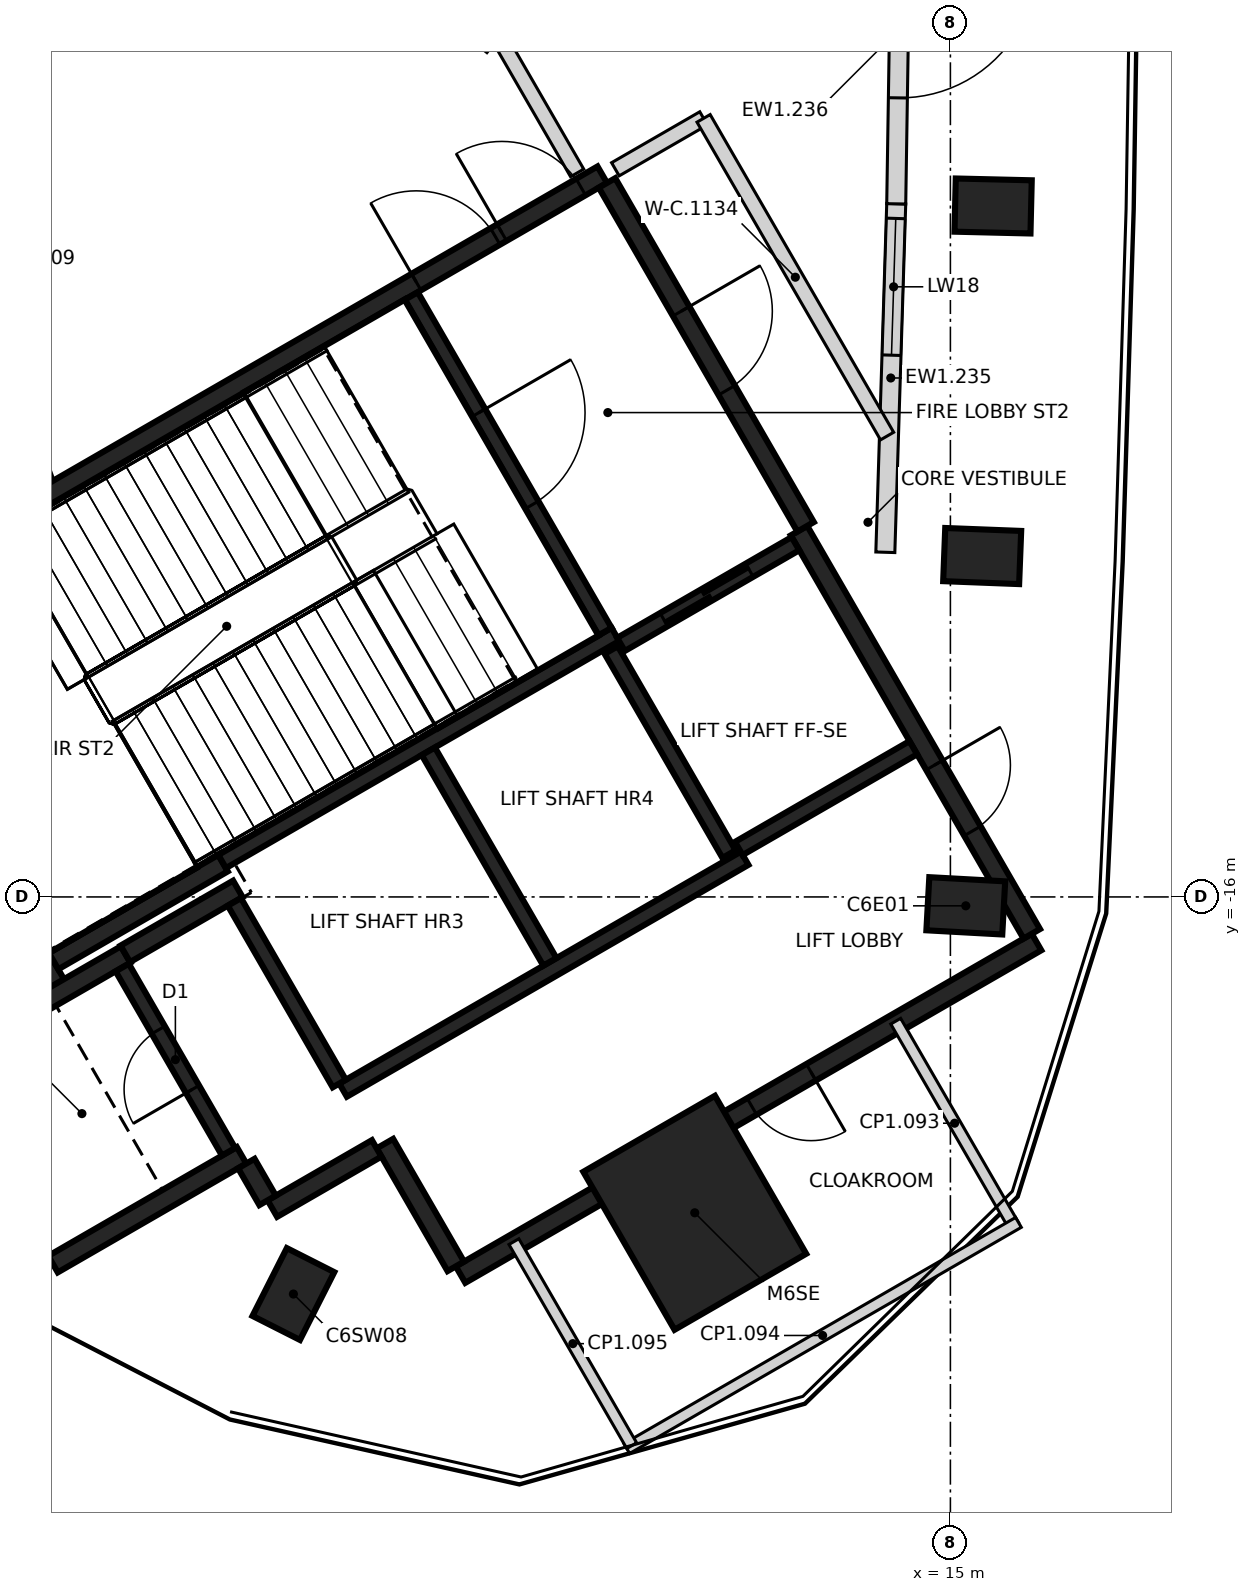
"""IFC4 building model, lengths in metres.
Left out: names, types, materials, properties, quantities, classifications, styles, units other than length and angle.
Written with IfcOpenShell. Run it as: python <this file> out.ifc"""

import sys

from ifc_helpers import new_model, si_unit, direction, frame, frame_2d, origin, origin_2d, place, context, subcontext, project, spatial, rectangle, extrude, element, fill, save


model = new_model("IFC4")
c1 = context("Model", 3, precision=1e-05, world=origin(), true_north=direction((0.0, 1.0)))
c2 = subcontext(c1, "Body", "Model", "MODEL_VIEW")
j1 = project(units=[si_unit("LENGTHUNIT", "METRE"), si_unit("PLANEANGLEUNIT", "RADIAN")], contexts=[c1])
p1 = place(None, origin())
s1 = spatial("IfcSite", under=j1, at=p1, CompositionType="ELEMENT")
p2 = place(p1, origin())
s2 = spatial("IfcBuilding", under=s1, at=p2, CompositionType="ELEMENT")
p3 = place(p2, frame((0.0, 0.0, 312.6)))
s3 = spatial("IfcBuildingStorey", under=s2, at=p3, CompositionType="ELEMENT", Elevation=312.6)
for number, where, z_axis, x_axis in (
    (1, (15.202, -16.117, -0.35), (0.0, 0.0, 1.0), (-0.998, 0.055, 0.0)),
    (2, (15.418, -11.515, -0.35), (0.0, 0.0, 1.0), (-0.999, 0.039, 0.0)),
    (3, (15.562, -6.91, -0.35), (0.0, 0.0, 1.0), (-1.0, 0.024, 0.0)),
    (4, (6.356, -21.224, -0.35), (0.0, 0.0, 1.0), (0.452, 0.892, 0.0)),
):
    element("IfcColumn", number, at=place(p3, frame(where, z_axis=z_axis, x_axis=x_axis)), inside=s3, PredefinedType="COLUMN", context=c2, shape_type="SweptSolid", body=[
        extrude(rectangle(XDim=1.0, YDim=0.7, at=origin_2d()), origin(), (0.0, 0.0, 1.0), 8.1),
    ])
p4 = place(p3, frame((11.637, -20.155, -0.35), z_axis=(0.0, 0.0, 1.0), x_axis=(-0.5, 0.866025403784, 0.0)))
e5 = element("IfcColumn", 5, at=p4, inside=s3, PredefinedType="COLUMN", context=c2, shape_type="SweptSolid", body=[
    extrude(rectangle(XDim=2.4, YDim=2.0, at=origin_2d()), origin(), (0.0, 0.0, 1.0), 8.1),
])
p5 = place(p3, frame((14.287, -6.88, 0.0), z_axis=(0.0, 0.0, 1.0), x_axis=(-0.03123309125, -0.999512127996, 0.0)))
e6 = element("IfcWall", 6, at=p5, inside=s3, PredefinedType="SOLIDWALL", context=c2, shape_type="SweptSolid", body=[
    extrude(rectangle(XDim=4.588, YDim=0.25, at=frame_2d((2.294, 0.0))), origin(), (0.0, 0.0, 1.0), 7.75),
])
p6 = place(p5, frame((0.194, 0.0, 0.9)))
e7 = element("IfcOpeningElement", 7, at=p6, cuts=e6, PredefinedType="OPENING", context=c2, shape_type="SweptSolid", body=[
    extrude(rectangle(XDim=1.8, YDim=2.4, at=frame_2d((0.9, 1.2))), frame((0.0, 0.135, 0.0), z_axis=(0.0, -1.0, 0.0), x_axis=(1.0, 0.0, 0.0)), (0.0, 0.0, 1.0), 0.27),
])
p7 = place(p3, frame((14.359, -2.293, 0.0), z_axis=(0.0, 0.0, 1.0), x_axis=(-0.015639712785, -0.999877692212, 0.0)))
e8 = element("IfcWall", 8, at=p7, inside=s3, PredefinedType="SOLIDWALL", context=c2, shape_type="SweptSolid", body=[
    extrude(rectangle(XDim=4.589, YDim=0.25, at=frame_2d((2.295, 0.0))), origin(), (0.0, 0.0, 1.0), 7.75),
])
p8 = place(p7, frame((1.395, 0.0, 0.0)))
e9 = element("IfcOpeningElement", 9, at=p8, cuts=e8, PredefinedType="OPENING", context=c2, shape_type="SweptSolid", body=[
    extrude(rectangle(XDim=1.8, YDim=2.4, at=frame_2d((0.9, 1.2))), frame((0.0, 0.135, 0.0), z_axis=(0.0, -1.0, 0.0), x_axis=(1.0, 0.0, 0.0)), (0.0, 0.0, 1.0), 0.27),
])
p9 = place(p3, frame((0.417, -12.273, 0.0), z_axis=(0.0, 0.0, 1.0), x_axis=(0.866021906294, 0.500006057782, 0.0)))
e10 = element("IfcWall", 10, at=p9, inside=s3, PredefinedType="SHEAR", context=c2, shape_type="SweptSolid", body=[
    extrude(rectangle(XDim=11.55, YDim=0.25, at=frame_2d((5.775, 0.0))), origin(), (0.0, 0.0, 1.0), 7.75),
])
p10 = place(p9, frame((10.025, 0.0, 0.0)))
e11 = element("IfcOpeningElement", 11, at=p10, cuts=e10, PredefinedType="OPENING", context=c2, shape_type="SweptSolid", body=[
    extrude(rectangle(XDim=1.2, YDim=2.1, at=frame_2d((0.6, 1.05))), frame((0.0, 0.135, 0.0), z_axis=(0.0, -1.0, 0.0), x_axis=(1.0, 0.0, 0.0)), (0.0, 0.0, 1.0), 0.27),
])
p11 = place(p9, frame((8.725, 0.0, 0.0)))
e12 = element("IfcOpeningElement", 12, at=p11, cuts=e10, PredefinedType="OPENING", context=c2, shape_type="SweptSolid", body=[
    extrude(rectangle(XDim=1.2, YDim=2.1, at=frame_2d((0.6, 1.05))), frame((0.0, 0.135, 0.0), z_axis=(0.0, -1.0, 0.0), x_axis=(1.0, 0.0, 0.0)), (0.0, 0.0, 1.0), 0.27),
])
p12 = place(p3, frame((16.133, -16.594, 0.0), z_axis=(0.0, 0.0, 1.0), x_axis=(-0.866022959057, -0.500004234368, 0.0)))
e13 = element("IfcWall", 13, at=p12, inside=s3, PredefinedType="SHEAR", context=c2, shape_type="SweptSolid", body=[
    extrude(rectangle(XDim=8.75, YDim=0.25, at=frame_2d((4.375, 0.0))), origin(), (0.0, 0.0, 1.0), 7.75),
])
p13 = place(p12, frame((3.425, 0.0, 0.0)))
e14 = element("IfcOpeningElement", 14, at=p13, cuts=e13, PredefinedType="OPENING", context=c2, shape_type="SweptSolid", body=[
    extrude(rectangle(XDim=0.9, YDim=2.1, at=frame_2d((0.45, 1.05))), frame((0.0, 0.135, 0.0), z_axis=(0.0, -1.0, 0.0), x_axis=(1.0, 0.0, 0.0)), (0.0, 0.0, 1.0), 0.27),
])
p14 = place(p3, frame((13.008, -11.181, 0.0), z_axis=(0.0, 0.0, 1.0), x_axis=(0.500001955336, -0.866024274868, 0.0)))
e15 = element("IfcWall", 15, at=p14, inside=s3, PredefinedType="SHEAR", context=c2, shape_type="SweptSolid", body=[
    extrude(rectangle(XDim=6.125, YDim=0.25, at=frame_2d((3.062, 0.0))), origin(), (0.0, 0.0, 1.0), 7.75),
])
p15 = place(p14, frame((3.563, 0.0, 0.0)))
e16 = element("IfcOpeningElement", 16, at=p15, cuts=e15, PredefinedType="OPENING", context=c2, shape_type="SweptSolid", body=[
    extrude(rectangle(XDim=1.0, YDim=2.1, at=frame_2d((0.5, 1.05))), frame((0.0, 0.135, 0.0), z_axis=(0.0, -1.0, 0.0), x_axis=(1.0, 0.0, 0.0)), (0.0, 0.0, 1.0), 0.27),
])
p16 = place(p3, frame((3.235, -17.153, 0.0), z_axis=(0.0, 0.0, 1.0), x_axis=(-0.500008851346, 0.866020293397, 0.0)))
e17 = element("IfcWall", 17, at=p16, inside=s3, PredefinedType="SHEAR", context=c2, shape_type="SweptSolid", body=[
    extrude(rectangle(XDim=5.51, YDim=0.25, at=frame_2d((2.755, 0.0))), origin(), (0.0, 0.0, 1.0), 7.75),
])
p17 = place(p3, frame((10.483, -6.606, 0.0), z_axis=(0.0, 0.0, 1.0), x_axis=(0.49999885962, -0.866026062182, 0.0)))
e18 = element("IfcWall", 18, at=p17, inside=s3, PredefinedType="SHEAR", context=c2, shape_type="SweptSolid", body=[
    extrude(rectangle(XDim=5.225, YDim=0.25, at=frame_2d((2.612, 0.0))), origin(), (0.0, 0.0, 1.0), 7.75),
])
p18 = place(p17, frame((1.95, 0.0, 0.0)))
e19 = element("IfcOpeningElement", 19, at=p18, cuts=e18, PredefinedType="OPENING", context=c2, shape_type="SweptSolid", body=[
    extrude(rectangle(XDim=1.2, YDim=2.1, at=frame_2d((0.6, 1.05))), frame((0.0, 0.135, 0.0), z_axis=(0.0, -1.0, 0.0), x_axis=(1.0, 0.0, 0.0)), (0.0, 0.0, 1.0), 0.27),
])
p19 = place(p3, frame((3.085, -20.894, 0.0), z_axis=(0.0, 0.0, 1.0), x_axis=(-0.499978833458, 0.866037623948, 0.0)))
e20 = element("IfcWall", 20, at=p19, inside=s3, PredefinedType="SHEAR", context=c2, shape_type="SweptSolid", body=[
    extrude(rectangle(XDim=3.05, YDim=0.25, at=frame_2d((1.525, 0.0))), origin(), (0.0, 0.0, 1.0), 7.75),
])
p20 = place(p3, frame((1.669, -18.19, 0.0), z_axis=(0.0, 0.0, 1.0), x_axis=(0.866042235819, 0.499970844928, 0.0)))
e21 = element("IfcWall", 21, at=p20, inside=s3, PredefinedType="SHEAR", context=c2, shape_type="SweptSolid", body=[
    extrude(rectangle(XDim=2.865, YDim=0.25, at=frame_2d((1.432, 0.0))), origin(), (0.0, 0.0, 1.0), 7.75),
])
p21 = place(p3, frame((5.675, -19.399, 0.0), z_axis=(0.0, 0.0, 1.0), x_axis=(-0.866026637627, -0.499997862916, 0.0)))
e22 = element("IfcWall", 22, at=p21, inside=s3, PredefinedType="SHEAR", context=c2, shape_type="SweptSolid", body=[
    extrude(rectangle(XDim=2.865, YDim=0.25, at=frame_2d((1.432, 0.0))), origin(), (0.0, 0.0, 1.0), 7.75),
])
p22 = place(p3, frame((5.431, -15.556, 0.0), z_axis=(0.0, 0.0, 1.0), x_axis=(-0.866022940537, -0.500004266446, 0.0)))
e23 = element("IfcWall", 23, at=p22, inside=s3, PredefinedType="SHEAR", context=c2, shape_type="SweptSolid", body=[
    extrude(rectangle(XDim=2.575, YDim=0.25, at=frame_2d((1.287, 0.0))), origin(), (0.0, 0.0, 1.0), 7.75),
])
p23 = place(p3, frame((8.493, -20.86, 0.0), z_axis=(0.0, 0.0, 1.0), x_axis=(-0.500039802285, 0.866002422705, 0.0)))
e24 = element("IfcWall", 24, at=p23, inside=s3, PredefinedType="SHEAR", context=c2, shape_type="SweptSolid", body=[
    extrude(rectangle(XDim=1.865, YDim=0.25, at=frame_2d((0.932, 0.0))), origin(), (0.0, 0.0, 1.0), 7.75),
])
p24 = place(p3, frame((4.145, -16.749, 0.0), z_axis=(0.0, 0.0, 1.0), x_axis=(0.866038183914, 0.499977863513, 0.0)))
e25 = element("IfcWall", 25, at=p24, inside=s3, PredefinedType="SHEAR", context=c2, shape_type="SweptSolid", body=[
    extrude(rectangle(XDim=1.71, YDim=0.25, at=frame_2d((0.855, 0.0))), origin(), (0.0, 0.0, 1.0), 7.75),
])
p25 = place(p3, frame((7.452, -19.308, 0.0), z_axis=(0.0, 0.0, 1.0), x_axis=(-0.866044474677, -0.49996696679, 0.0)))
e26 = element("IfcWall", 26, at=p25, inside=s3, PredefinedType="SHEAR", context=c2, shape_type="SweptSolid", body=[
    extrude(rectangle(XDim=1.584, YDim=0.25, at=frame_2d((0.792, 0.0))), origin(), (0.0, 0.0, 1.0), 7.75),
])
p26 = place(p3, frame((6.017, -19.992, 0.0), z_axis=(0.0, 0.0, 1.0), x_axis=(-0.500364886717, 0.865814633822, 0.0)))
e27 = element("IfcWall", 27, at=p26, inside=s3, PredefinedType="SHEAR", context=c2, shape_type="SweptSolid", body=[
    extrude(rectangle(XDim=0.559, YDim=0.25, at=frame_2d((0.28, 0.0))), origin(), (0.0, 0.0, 1.0), 7.75),
])
p27 = place(p3, frame((5.419, -15.534, 0.0), z_axis=(0.0, 0.0, 1.0), x_axis=(0.866029065029, 0.499993658486, 0.0)))
e28 = element("IfcWall", 28, at=p27, inside=s3, PredefinedType="SHEAR", context=c2, shape_type="SweptSolid", body=[
    extrude(rectangle(XDim=5.974, YDim=0.2, at=frame_2d((2.987, 0.0))), origin(), (0.0, 0.0, 1.0), 7.75),
])
p28 = place(p3, frame((7.01, -18.542, 0.0), z_axis=(0.0, 0.0, 1.0), x_axis=(0.866030299012, 0.499991521122, 0.0)))
e29 = element("IfcWall", 29, at=p28, inside=s3, PredefinedType="SHEAR", context=c2, shape_type="SweptSolid", body=[
    extrude(rectangle(XDim=6.1, YDim=0.2, at=frame_2d((3.05, 0.0))), origin(), (0.0, 0.0, 1.0), 7.75),
])
p29 = place(p3, frame((7.906, -8.094, 0.0), z_axis=(0.0, 0.0, 1.0), x_axis=(0.500027839223, -0.866009330205, 0.0)))
e30 = element("IfcWall", 30, at=p29, inside=s3, PredefinedType="SHEAR", context=c2, shape_type="SweptSolid", body=[
    extrude(rectangle(XDim=5.098, YDim=0.2, at=frame_2d((2.549, 0.0))), origin(), (0.0, 0.0, 1.0), 7.75),
])
p30 = place(p29, frame((1.774, 0.0, 0.0)))
e31 = element("IfcOpeningElement", 31, at=p30, cuts=e30, PredefinedType="OPENING", context=c2, shape_type="SweptSolid", body=[
    extrude(rectangle(XDim=1.4, YDim=2.1, at=frame_2d((0.7, 1.05))), frame((0.0, 0.11, 0.0), z_axis=(0.0, -1.0, 0.0), x_axis=(1.0, 0.0, 0.0)), (0.0, 0.0, 1.0), 0.22),
])
p31 = place(p3, frame((8.132, -14.084, 0.0), z_axis=(0.0, 0.0, 1.0), x_axis=(0.499997778408, -0.866026686418, 0.0)))
e32 = element("IfcWall", 32, at=p31, inside=s3, PredefinedType="SHEAR", context=c2, shape_type="SweptSolid", body=[
    extrude(rectangle(XDim=3.198, YDim=0.2, at=frame_2d((1.599, 0.0))), origin(), (0.0, 0.0, 1.0), 7.75),
])
p32 = place(p3, frame((5.503, -19.352, 0.0), z_axis=(0.0, 0.0, 1.0), x_axis=(-0.499986818241, 0.866033014143, 0.0)))
e33 = element("IfcWall", 33, at=p32, inside=s3, PredefinedType="SHEAR", context=c2, shape_type="SweptSolid", body=[
    extrude(rectangle(XDim=2.798, YDim=0.2, at=frame_2d((1.399, 0.0))), origin(), (0.0, 0.0, 1.0), 7.75),
])
p33 = place(p32, frame((0.949, 0.0, 0.0)))
e34 = element("IfcOpeningElement", 34, at=p33, cuts=e33, PredefinedType="OPENING", context=c2, shape_type="SweptSolid", body=[
    extrude(rectangle(XDim=0.9, YDim=2.1, at=frame_2d((0.45, 1.05))), frame((0.0, 0.11, 0.0), z_axis=(0.0, -1.0, 0.0), x_axis=(1.0, 0.0, 0.0)), (0.0, 0.0, 1.0), 0.22),
])
p34 = place(p3, frame((6.96, -18.455, 0.0), z_axis=(0.0, 0.0, 1.0), x_axis=(-0.499926705758, 0.866067716099, 0.0)))
e35 = element("IfcWall", 35, at=p34, inside=s3, PredefinedType="SHEAR", context=c2, shape_type="SweptSolid", body=[
    extrude(rectangle(XDim=2.759, YDim=0.2, at=frame_2d((1.38, 0.0))), origin(), (0.0, 0.0, 1.0), 7.75),
])
p35 = place(p3, frame((12.088, -15.437, 0.0), z_axis=(0.0, 0.0, 1.0), x_axis=(-0.500026960575, 0.86600983753, 0.0)))
e36 = element("IfcWall", 36, at=p35, inside=s3, PredefinedType="SHEAR", context=c2, shape_type="SweptSolid", body=[
    extrude(rectangle(XDim=3.1, YDim=0.2, at=frame_2d((1.55, 0.0))), origin(), (0.0, 0.0, 1.0), 7.75),
])
p36 = place(p3, frame((10.666, -12.678, 0.0), z_axis=(0.0, 0.0, 1.0), x_axis=(0.866018407898, 0.500012117035, 0.0)))
e37 = element("IfcWall", 37, at=p36, inside=s3, PredefinedType="SHEAR", context=c2, shape_type="SweptSolid", body=[
    extrude(rectangle(XDim=2.651, YDim=0.2, at=frame_2d((1.325, 0.0))), origin(), (0.0, 0.0, 1.0), 7.75),
])
p37 = place(p36, frame((0.652, 0.0, 0.0)))
e38 = element("IfcOpeningElement", 38, at=p37, cuts=e37, PredefinedType="OPENING", context=c2, shape_type="SweptSolid", body=[
    extrude(rectangle(XDim=1.3, YDim=2.1, at=frame_2d((0.65, 1.05))), frame((0.0, 0.11, 0.0), z_axis=(0.0, -1.0, 0.0), x_axis=(1.0, 0.0, 0.0)), (0.0, 0.0, 1.0), 0.22),
])
p38 = place(p3, frame((14.512, -14.037, 0.0), z_axis=(0.0, 0.0, 1.0), x_axis=(-0.866018407898, -0.500012117035, 0.0)))
e39 = element("IfcWall", 39, at=p38, inside=s3, PredefinedType="SHEAR", context=c2, shape_type="SweptSolid", body=[
    extrude(rectangle(XDim=2.651, YDim=0.2, at=frame_2d((1.325, 0.0))), origin(), (0.0, 0.0, 1.0), 7.75),
])
p39 = place(p3, frame((14.281, -17.635, 0.0), z_axis=(0.0, 0.0, 1.0), x_axis=(0.49999285859, -0.86602952684, 0.0)))
e40 = element("IfcWall", 40, at=p39, inside=s3, PredefinedType="PARTITIONING", context=c2, shape_type="SweptSolid", body=[
    extrude(rectangle(XDim=3.1, YDim=0.15, at=frame_2d((1.55, 0.0))), origin(), (0.0, 0.0, 1.0), 7.75),
])
p40 = place(p3, frame((15.896, -20.282, 0.0), z_axis=(0.0, 0.0, 1.0), x_axis=(-0.866017493347, -0.500013701029, 0.0)))
e41 = element("IfcWall", 41, at=p40, inside=s3, PredefinedType="PARTITIONING", context=c2, shape_type="SweptSolid", body=[
    extrude(rectangle(XDim=5.95, YDim=0.15, at=frame_2d((2.975, 0.0))), origin(), (0.0, 0.0, 1.0), 7.75),
])
p41 = place(p3, frame((10.808, -23.219, 0.0), z_axis=(0.0, 0.0, 1.0), x_axis=(-0.500026960575, 0.86600983753, 0.0)))
e42 = element("IfcWall", 42, at=p41, inside=s3, PredefinedType="PARTITIONING", context=c2, shape_type="SweptSolid", body=[
    extrude(rectangle(XDim=3.1, YDim=0.15, at=frame_2d((1.55, 0.0))), origin(), (0.0, 0.0, 1.0), 7.75),
])
p42 = place(p3, frame((10.593, -6.427, 0.0), z_axis=(0.0, 0.0, 1.0), x_axis=(0.866115802186, 0.499843392678, 0.0)))
e43 = element("IfcWall", 43, at=p42, inside=s3, PredefinedType="PARTITIONING", context=c2, shape_type="SweptSolid", body=[
    extrude(rectangle(XDim=1.34, YDim=0.2, at=frame_2d((0.67, 0.0))), origin(), (0.0, 0.0, 1.0), 7.75),
])
p43 = place(p3, frame((11.753, -5.757, 0.0), z_axis=(0.0, 0.0, 1.0), x_axis=(0.500120854176, -0.865955617349, 0.0)))
e44 = element("IfcWall", 44, at=p43, inside=s3, PredefinedType="PARTITIONING", context=c2, shape_type="SweptSolid", body=[
    extrude(rectangle(XDim=4.827, YDim=0.2, at=frame_2d((2.414, 0.0))), origin(), (0.0, 0.0, 1.0), 7.75),
])
p44 = place(p3, frame((0.545, -3.525, 0.0), z_axis=(0.0, 0.0, 1.0), x_axis=(0.343284274362, -0.93923155131, 0.0)))
e45 = element("IfcWall", 45, at=p44, inside=s3, PredefinedType="PARTITIONING", context=c2, shape_type="SweptSolid", body=[
    extrude(rectangle(XDim=7.438, YDim=0.2, at=frame_2d((3.719, 0.0))), origin(), (0.0, 0.0, 1.0), 7.75),
])
p45 = place(p44, frame((3.248, 0.0, 0.0)))
e46 = element("IfcOpeningElement", 46, at=p45, cuts=e45, PredefinedType="OPENING", context=c2, shape_type="SweptSolid", body=[
    extrude(rectangle(XDim=1.0, YDim=2.1, at=frame_2d((0.5, 1.05))), frame((0.0, 0.11, 0.0), z_axis=(0.0, -1.0, 0.0), x_axis=(1.0, 0.0, 0.0)), (0.0, 0.0, 1.0), 0.22),
])
p46 = place(p3, frame((9.097, -4.755, 0.0), z_axis=(0.0, 0.0, 1.0), x_axis=(0.499867898641, -0.866101659107, 0.0)))
e47 = element("IfcWall", 47, at=p46, inside=s3, PredefinedType="PARTITIONING", context=c2, shape_type="SweptSolid", body=[
    extrude(rectangle(XDim=1.986, YDim=0.2, at=frame_2d((0.993, 0.0))), origin(), (0.0, 0.0, 1.0), 7.75),
])
p47 = place(p6, origin())
e48 = element("IfcWindow", 48, at=p47, inside=s3, PartitioningType="SINGLE_PANEL", PredefinedType="WINDOW", context=c2, shape_type="SweptSolid", body=[
    extrude(rectangle(XDim=1.8, YDim=2.4, at=frame_2d((0.9, 1.2))), frame((0.0, 0.03, 0.0), z_axis=(0.0, -1.0, 0.0), x_axis=(1.0, 0.0, 0.0)), (0.0, 0.0, 1.0), 0.06),
])
fill(e7, e48)
p48 = place(p8, origin())
e49 = element("IfcDoor", 49, at=p48, inside=s3, OperationType="DOUBLE_DOOR_DOUBLE_SWING", PredefinedType="DOOR", context=c2, shape_type="SweptSolid", body=[
    extrude(rectangle(XDim=1.8, YDim=2.4, at=frame_2d((0.9, 1.2))), frame((0.0, 0.025, 0.0), z_axis=(0.0, -1.0, 0.0), x_axis=(1.0, 0.0, 0.0)), (0.0, 0.0, 1.0), 0.05),
])
fill(e9, e49)
p49 = place(p37, origin())
e50 = element("IfcDoor", 50, at=p49, inside=s3, OperationType="SLIDING_TO_LEFT", PredefinedType="DOOR", context=c2, shape_type="SweptSolid", body=[
    extrude(rectangle(XDim=1.3, YDim=2.1, at=frame_2d((0.65, 1.05))), frame((0.0, 0.025, 0.0), z_axis=(0.0, -1.0, 0.0), x_axis=(1.0, 0.0, 0.0)), (0.0, 0.0, 1.0), 0.05),
])
fill(e38, e50)
p50 = place(p15, origin())
e51 = element("IfcDoor", 51, at=p50, inside=s3, OperationType="SINGLE_SWING_LEFT", PredefinedType="DOOR", context=c2, shape_type="SweptSolid", body=[
    extrude(rectangle(XDim=1.0, YDim=2.1, at=frame_2d((0.5, 1.05))), frame((0.0, 0.025, 0.0), z_axis=(0.0, -1.0, 0.0), x_axis=(1.0, 0.0, 0.0)), (0.0, 0.0, 1.0), 0.05),
])
fill(e16, e51)
p51 = place(p10, origin())
e52 = element("IfcDoor", 52, at=p51, inside=s3, OperationType="SINGLE_SWING_LEFT", PredefinedType="DOOR", context=c2, shape_type="SweptSolid", body=[
    extrude(rectangle(XDim=1.2, YDim=2.1, at=frame_2d((0.6, 1.05))), frame((0.0, 0.025, 0.0), z_axis=(0.0, -1.0, 0.0), x_axis=(1.0, 0.0, 0.0)), (0.0, 0.0, 1.0), 0.05),
])
fill(e11, e52)
p52 = place(p11, origin())
e53 = element("IfcDoor", 53, at=p52, inside=s3, OperationType="SINGLE_SWING_RIGHT", PredefinedType="DOOR", context=c2, shape_type="SweptSolid", body=[
    extrude(rectangle(XDim=1.2, YDim=2.1, at=frame_2d((0.6, 1.05))), frame((0.0, 0.025, 0.0), z_axis=(0.0, -1.0, 0.0), x_axis=(1.0, 0.0, 0.0)), (0.0, 0.0, 1.0), 0.05),
])
fill(e12, e53)
p53 = place(p18, origin())
e54 = element("IfcDoor", 54, at=p53, inside=s3, OperationType="SINGLE_SWING_LEFT", PredefinedType="DOOR", context=c2, shape_type="SweptSolid", body=[
    extrude(rectangle(XDim=1.2, YDim=2.1, at=frame_2d((0.6, 1.05))), frame((0.0, 0.025, 0.0), z_axis=(0.0, -1.0, 0.0), x_axis=(1.0, 0.0, 0.0)), (0.0, 0.0, 1.0), 0.05),
])
fill(e19, e54)
p54 = place(p30, origin())
e55 = element("IfcDoor", 55, at=p54, inside=s3, OperationType="SINGLE_SWING_RIGHT", PredefinedType="DOOR", context=c2, shape_type="SweptSolid", body=[
    extrude(rectangle(XDim=1.4, YDim=2.1, at=frame_2d((0.7, 1.05))), frame((0.0, 0.025, 0.0), z_axis=(0.0, -1.0, 0.0), x_axis=(1.0, 0.0, 0.0)), (0.0, 0.0, 1.0), 0.05),
])
fill(e31, e55)
p55 = place(p33, origin())
e56 = element("IfcDoor", 56, at=p55, inside=s3, OperationType="SINGLE_SWING_LEFT", PredefinedType="DOOR", context=c2, shape_type="SweptSolid", body=[
    extrude(rectangle(XDim=0.9, YDim=2.1, at=frame_2d((0.45, 1.05))), frame((0.0, 0.025, 0.0), z_axis=(0.0, -1.0, 0.0), x_axis=(1.0, 0.0, 0.0)), (0.0, 0.0, 1.0), 0.05),
])
fill(e34, e56)
p56 = place(p13, origin())
e57 = element("IfcDoor", 57, at=p56, inside=s3, OperationType="SINGLE_SWING_LEFT", PredefinedType="DOOR", context=c2, shape_type="SweptSolid", body=[
    extrude(rectangle(XDim=0.9, YDim=2.1, at=frame_2d((0.45, 1.05))), frame((0.0, 0.025, 0.0), z_axis=(0.0, -1.0, 0.0), x_axis=(1.0, 0.0, 0.0)), (0.0, 0.0, 1.0), 0.05),
])
fill(e14, e57)
save(model, sys.argv[1])
